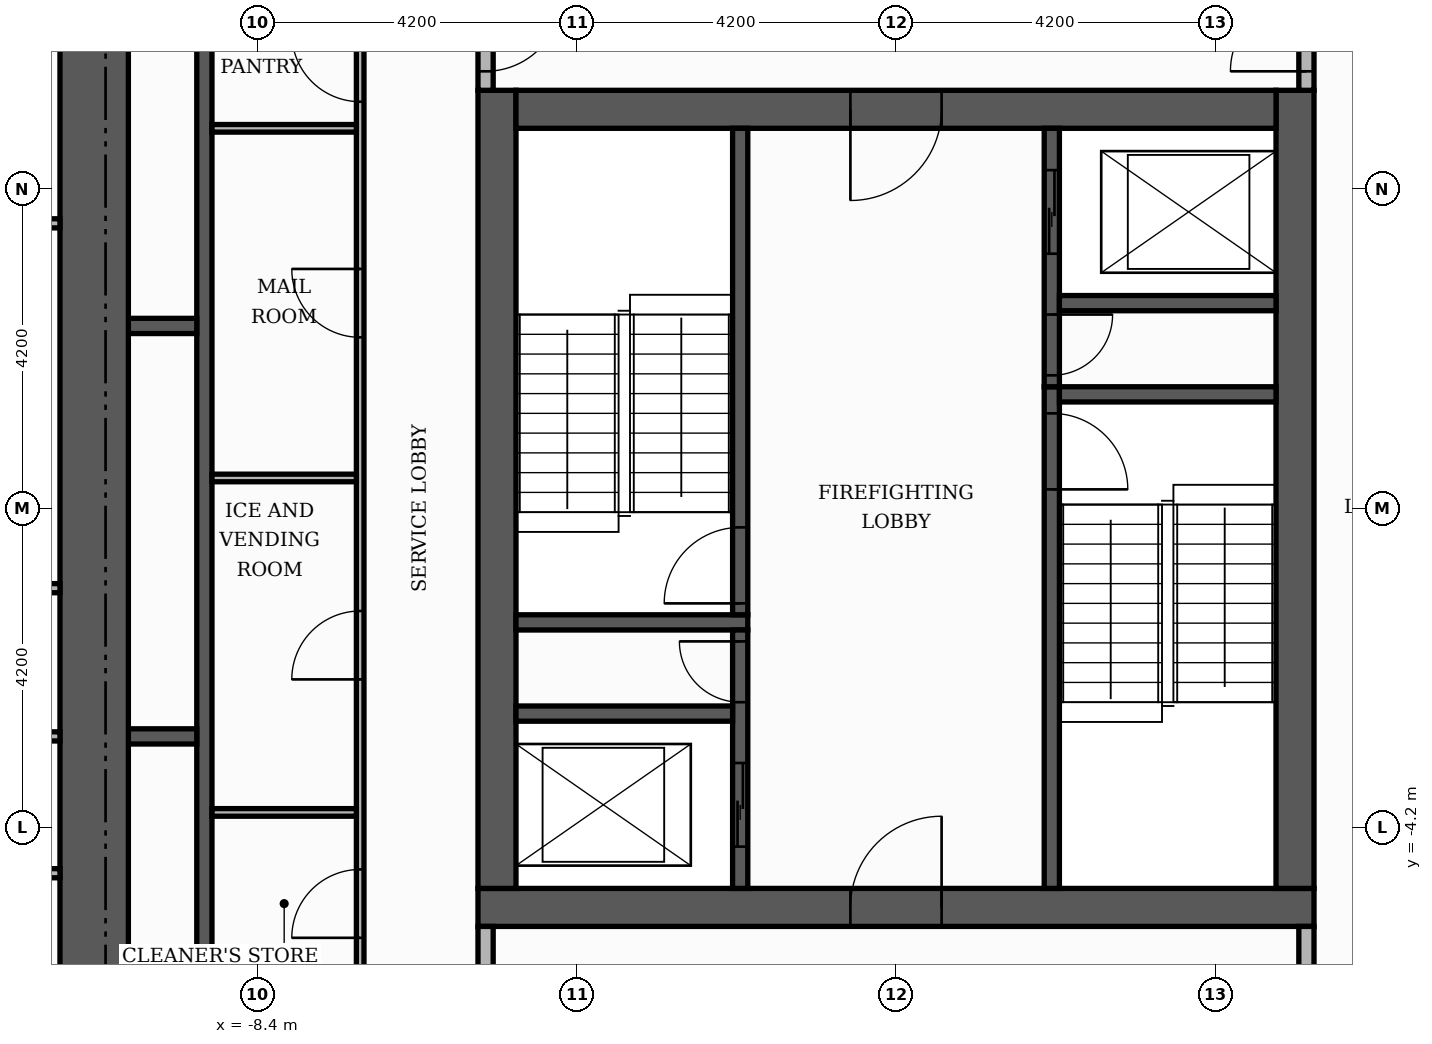
"""IFC4 building model, lengths in metres.
Left out: names, types, materials, properties, quantities, classifications, styles, units other than length and angle.
Written with IfcOpenShell. Run it as: python <this file> out.ifc"""

import sys

from ifc_helpers import new_model, si_unit, direction, frame, frame_2d, origin, place, context, subcontext, project, spatial, rectangle, extrude, element, fill, save


model = new_model("IFC4")
c1 = context("Model", 3, precision=1e-05, world=origin(), true_north=direction((0.0, 1.0)))
c2 = subcontext(c1, "Body", "Model", "MODEL_VIEW")
j1 = project(units=[si_unit("LENGTHUNIT", "METRE"), si_unit("PLANEANGLEUNIT", "RADIAN")], contexts=[c1])
p1 = place(None, origin())
s1 = spatial("IfcSite", under=j1, at=p1, CompositionType="ELEMENT")
p2 = place(p1, origin())
s2 = spatial("IfcBuilding", under=s1, at=p2, CompositionType="ELEMENT")
p3 = place(p2, frame((0.0, 0.0, 279.6)))
s3 = spatial("IfcBuildingStorey", under=s2, at=p3, CompositionType="ELEMENT", Elevation=279.6)
p4 = place(p3, frame((-5.5, -5.25, 0.0), z_axis=(0.0, 0.0, 1.0), x_axis=(1.0, 0.0, 0.0)))
e1 = element("IfcWall", 1, at=p4, inside=s3, PredefinedType="SHEAR", context=c2, shape_type="SweptSolid", body=[
    extrude(rectangle(XDim=11.0, YDim=0.5, at=frame_2d((5.5, 0.0))), origin(), (0.0, 0.0, 1.0), 3.48),
])
p5 = place(p4, frame((4.9, 0.0, 0.0)))
e2 = element("IfcOpeningElement", 2, at=p5, cuts=e1, PredefinedType="OPENING", context=c2, shape_type="SweptSolid", body=[
    extrude(rectangle(XDim=1.2, YDim=2.1, at=frame_2d((0.6, 1.05))), frame((0.0, 0.26, 0.0), z_axis=(0.0, -1.0, 0.0), x_axis=(1.0, 0.0, 0.0)), (0.0, 0.0, 1.0), 0.52),
])
for number, where, z_axis, x_axis in (
    (3, (-5.25, -5.0, 0.0), (0.0, 0.0, 1.0), (0.0, 1.0, 0.0)),
    (4, (5.25, -5.0, 0.0), (0.0, 0.0, 1.0), (0.0, 1.0, 0.0)),
):
    element("IfcWall", number, at=place(p3, frame(where, z_axis=z_axis, x_axis=x_axis)), inside=s3, PredefinedType="SHEAR", context=c2, shape_type="SweptSolid", body=[
        extrude(rectangle(XDim=10.5, YDim=0.5, at=frame_2d((5.25, 0.0))), origin(), (0.0, 0.0, 1.0), 3.48),
    ])
p6 = place(p3, frame((-5.0, 5.25, 0.0), z_axis=(0.0, 0.0, 1.0), x_axis=(1.0, 0.0, 0.0)))
e5 = element("IfcWall", 5, at=p6, inside=s3, PredefinedType="SHEAR", context=c2, shape_type="SweptSolid", body=[
    extrude(rectangle(XDim=10.0, YDim=0.5, at=frame_2d((5.0, 0.0))), origin(), (0.0, 0.0, 1.0), 3.48),
])
p7 = place(p6, frame((4.4, 0.0, 0.0)))
e6 = element("IfcOpeningElement", 6, at=p7, cuts=e5, PredefinedType="OPENING", context=c2, shape_type="SweptSolid", body=[
    extrude(rectangle(XDim=1.2, YDim=2.1, at=frame_2d((0.6, 1.05))), frame((0.0, 0.26, 0.0), z_axis=(0.0, -1.0, 0.0), x_axis=(1.0, 0.0, 0.0)), (0.0, 0.0, 1.0), 0.52),
])
p8 = place(p3, frame((2.05, -5.0, 0.0), z_axis=(0.0, 0.0, 1.0), x_axis=(0.0, 1.0, 0.0)))
e7 = element("IfcWall", 7, at=p8, inside=s3, PredefinedType="SHEAR", context=c2, shape_type="SweptSolid", body=[
    extrude(rectangle(XDim=6.6, YDim=0.2, at=frame_2d((3.3, 0.0))), origin(), (0.0, 0.0, 1.0), 3.48),
])
p9 = place(p8, frame((5.25, 0.0, 0.0)))
e8 = element("IfcOpeningElement", 8, at=p9, cuts=e7, PredefinedType="OPENING", context=c2, shape_type="SweptSolid", body=[
    extrude(rectangle(XDim=1.0, YDim=2.1, at=frame_2d((0.5, 1.05))), frame((0.0, 0.11, 0.0), z_axis=(0.0, -1.0, 0.0), x_axis=(1.0, 0.0, 0.0)), (0.0, 0.0, 1.0), 0.22),
])
p10 = place(p3, frame((-5.0, -1.5, 0.0), z_axis=(0.0, 0.0, 1.0), x_axis=(1.0, 0.0, 0.0)))
e9 = element("IfcWall", 9, at=p10, inside=s3, PredefinedType="SHEAR", context=c2, shape_type="SweptSolid", body=[
    extrude(rectangle(XDim=3.05, YDim=0.2, at=frame_2d((1.525, 0.0))), origin(), (0.0, 0.0, 1.0), 3.48),
])
p11 = place(p3, frame((-2.05, -1.4, 0.0), z_axis=(0.0, 0.0, 1.0), x_axis=(0.0, 1.0, 0.0)))
e10 = element("IfcWall", 10, at=p11, inside=s3, PredefinedType="SHEAR", context=c2, shape_type="SweptSolid", body=[
    extrude(rectangle(XDim=6.4, YDim=0.2, at=frame_2d((3.2, 0.0))), origin(), (0.0, 0.0, 1.0), 3.48),
])
p12 = place(p11, frame((0.15, 0.0, 0.0)))
e11 = element("IfcOpeningElement", 11, at=p12, cuts=e10, PredefinedType="OPENING", context=c2, shape_type="SweptSolid", body=[
    extrude(rectangle(XDim=1.0, YDim=2.1, at=frame_2d((0.5, 1.05))), frame((0.0, 0.11, 0.0), z_axis=(0.0, -1.0, 0.0), x_axis=(1.0, 0.0, 0.0)), (0.0, 0.0, 1.0), 0.22),
])
p13 = place(p3, frame((2.15, 1.5, 0.0), z_axis=(0.0, 0.0, 1.0), x_axis=(1.0, 0.0, 0.0)))
e12 = element("IfcWall", 12, at=p13, inside=s3, PredefinedType="SHEAR", context=c2, shape_type="SweptSolid", body=[
    extrude(rectangle(XDim=2.85, YDim=0.2, at=frame_2d((1.425, 0.0))), origin(), (0.0, 0.0, 1.0), 3.48),
])
p14 = place(p3, frame((-9.1, -8.2, 0.0), z_axis=(0.0, 0.0, 1.0), x_axis=(0.0, 1.0, 0.0)))
e13 = element("IfcWall", 13, at=p14, inside=s3, PredefinedType="SHEAR", context=c2, shape_type="SweptSolid", body=[
    extrude(rectangle(XDim=16.4, YDim=0.2, at=frame_2d((8.2, 0.0))), origin(), (0.0, 0.0, 1.0), 3.48),
])
p15 = place(p3, frame((-2.05, -5.0, 0.0), z_axis=(0.0, 0.0, 1.0), x_axis=(0.0, 1.0, 0.0)))
e14 = element("IfcWall", 14, at=p15, inside=s3, PredefinedType="SHEAR", context=c2, shape_type="SweptSolid", body=[
    extrude(rectangle(XDim=3.4, YDim=0.2, at=frame_2d((1.7, 0.0))), origin(), (0.0, 0.0, 1.0), 3.48),
])
p16 = place(p15, frame((0.55, 0.0, 0.0)))
e15 = element("IfcOpeningElement", 15, at=p16, cuts=e14, PredefinedType="OPENING", context=c2, shape_type="SweptSolid", body=[
    extrude(rectangle(XDim=1.1, YDim=2.1, at=frame_2d((0.55, 1.05))), frame((0.0, 0.11, 0.0), z_axis=(0.0, -1.0, 0.0), x_axis=(1.0, 0.0, 0.0)), (0.0, 0.0, 1.0), 0.22),
])
p17 = place(p15, frame((2.45, 0.0, 0.0)))
e16 = element("IfcOpeningElement", 16, at=p17, cuts=e14, PredefinedType="OPENING", context=c2, shape_type="SweptSolid", body=[
    extrude(rectangle(XDim=0.8, YDim=2.1, at=frame_2d((0.4, 1.05))), frame((0.0, 0.11, 0.0), z_axis=(0.0, -1.0, 0.0), x_axis=(1.0, 0.0, 0.0)), (0.0, 0.0, 1.0), 0.22),
])
p18 = place(p3, frame((-10.1, -3.0, 0.0), z_axis=(0.0, 0.0, 1.0), x_axis=(1.0, 0.0, 0.0)))
e17 = element("IfcWall", 17, at=p18, inside=s3, PredefinedType="SHEAR", context=c2, shape_type="SweptSolid", body=[
    extrude(rectangle(XDim=0.9, YDim=0.2, at=frame_2d((0.45, 0.0))), origin(), (0.0, 0.0, 1.0), 3.48),
])
p19 = place(p3, frame((-5.0, -2.7, 0.0), z_axis=(0.0, 0.0, 1.0), x_axis=(1.0, 0.0, 0.0)))
e18 = element("IfcWall", 18, at=p19, inside=s3, PredefinedType="SHEAR", context=c2, shape_type="SweptSolid", body=[
    extrude(rectangle(XDim=2.85, YDim=0.2, at=frame_2d((1.425, 0.0))), origin(), (0.0, 0.0, 1.0), 3.48),
])
p20 = place(p3, frame((2.05, 1.6, 0.0), z_axis=(0.0, 0.0, 1.0), x_axis=(0.0, 1.0, 0.0)))
e19 = element("IfcWall", 19, at=p20, inside=s3, PredefinedType="SHEAR", context=c2, shape_type="SweptSolid", body=[
    extrude(rectangle(XDim=3.4, YDim=0.2, at=frame_2d((1.7, 0.0))), origin(), (0.0, 0.0, 1.0), 3.48),
])
p21 = place(p20, frame((1.75, 0.0, 0.0)))
e20 = element("IfcOpeningElement", 20, at=p21, cuts=e19, PredefinedType="OPENING", context=c2, shape_type="SweptSolid", body=[
    extrude(rectangle(XDim=1.1, YDim=2.1, at=frame_2d((0.55, 1.05))), frame((0.0, 0.11, 0.0), z_axis=(0.0, -1.0, 0.0), x_axis=(1.0, 0.0, 0.0)), (0.0, 0.0, 1.0), 0.22),
])
p22 = place(p20, frame((0.15, 0.0, 0.0)))
e21 = element("IfcOpeningElement", 21, at=p22, cuts=e19, PredefinedType="OPENING", context=c2, shape_type="SweptSolid", body=[
    extrude(rectangle(XDim=0.8, YDim=2.1, at=frame_2d((0.4, 1.05))), frame((0.0, 0.11, 0.0), z_axis=(0.0, -1.0, 0.0), x_axis=(1.0, 0.0, 0.0)), (0.0, 0.0, 1.0), 0.22),
])
p23 = place(p3, frame((-10.1, 2.4, 0.0), z_axis=(0.0, 0.0, 1.0), x_axis=(1.0, 0.0, 0.0)))
e22 = element("IfcWall", 22, at=p23, inside=s3, PredefinedType="SHEAR", context=c2, shape_type="SweptSolid", body=[
    extrude(rectangle(XDim=0.9, YDim=0.2, at=frame_2d((0.45, 0.0))), origin(), (0.0, 0.0, 1.0), 3.48),
])
p24 = place(p3, frame((2.15, 2.7, 0.0), z_axis=(0.0, 0.0, 1.0), x_axis=(1.0, 0.0, 0.0)))
e23 = element("IfcWall", 23, at=p24, inside=s3, PredefinedType="SHEAR", context=c2, shape_type="SweptSolid", body=[
    extrude(rectangle(XDim=2.85, YDim=0.2, at=frame_2d((1.425, 0.0))), origin(), (0.0, 0.0, 1.0), 3.48),
])
p25 = place(p3, frame((-10.55, -10.1, 0.0), z_axis=(0.0, 0.0, 1.0), x_axis=(0.0, 1.0, 0.0)))
e24 = element("IfcWall", 24, at=p25, inside=s3, PredefinedType="SHEAR", context=c2, shape_type="SweptSolid", body=[
    extrude(rectangle(XDim=20.2, YDim=0.9, at=frame_2d((10.1, 0.0))), origin(), (0.0, 0.0, 1.0), 3.48),
])
p26 = place(p3, frame((-5.4, -10.1, 0.0), z_axis=(0.0, 0.0, 1.0), x_axis=(0.0, 1.0, 0.0)))
e25 = element("IfcWall", 25, at=p26, inside=s3, PredefinedType="PARTITIONING", context=c2, shape_type="SweptSolid", body=[
    extrude(rectangle(XDim=4.6, YDim=0.2, at=frame_2d((2.3, 0.0))), origin(), (0.0, 0.0, 1.0), 3.48),
])
p27 = place(p26, frame((2.9, 0.0, 0.0)))
e26 = element("IfcOpeningElement", 26, at=p27, cuts=e25, PredefinedType="OPENING", context=c2, shape_type="SweptSolid", body=[
    extrude(rectangle(XDim=1.0, YDim=2.1, at=frame_2d((0.5, 1.05))), frame((0.0, 0.11, 0.0), z_axis=(0.0, -1.0, 0.0), x_axis=(1.0, 0.0, 0.0)), (0.0, 0.0, 1.0), 0.22),
])
p28 = place(p3, frame((5.4, -10.1, 0.0), z_axis=(0.0, 0.0, 1.0), x_axis=(0.0, 1.0, 0.0)))
e27 = element("IfcWall", 27, at=p28, inside=s3, PredefinedType="PARTITIONING", context=c2, shape_type="SweptSolid", body=[
    extrude(rectangle(XDim=4.6, YDim=0.2, at=frame_2d((2.3, 0.0))), origin(), (0.0, 0.0, 1.0), 3.48),
])
p29 = place(p28, frame((2.9, 0.0, 0.0)))
e28 = element("IfcOpeningElement", 28, at=p29, cuts=e27, PredefinedType="OPENING", context=c2, shape_type="SweptSolid", body=[
    extrude(rectangle(XDim=1.0, YDim=2.1, at=frame_2d((0.5, 1.05))), frame((0.0, 0.11, 0.0), z_axis=(0.0, -1.0, 0.0), x_axis=(1.0, 0.0, 0.0)), (0.0, 0.0, 1.0), 0.22),
])
p30 = place(p3, frame((-7.05, -8.2, 0.0), z_axis=(0.0, 0.0, 1.0), x_axis=(0.0, 1.0, 0.0)))
e29 = element("IfcWall", 29, at=p30, inside=s3, PredefinedType="PARTITIONING", context=c2, shape_type="SweptSolid", body=[
    extrude(rectangle(XDim=16.4, YDim=0.1, at=frame_2d((8.2, 0.0))), origin(), (0.0, 0.0, 1.0), 3.48),
])
p31 = place(p30, frame((0.45, 0.0, 0.0)))
e30 = element("IfcOpeningElement", 30, at=p31, cuts=e29, PredefinedType="OPENING", context=c2, shape_type="SweptSolid", body=[
    extrude(rectangle(XDim=0.9, YDim=2.1, at=frame_2d((0.45, 1.05))), frame((0.0, 0.06, 0.0), z_axis=(0.0, -1.0, 0.0), x_axis=(1.0, 0.0, 0.0)), (0.0, 0.0, 1.0), 0.12),
])
p32 = place(p30, frame((2.55, 0.0, 0.0)))
e31 = element("IfcOpeningElement", 31, at=p32, cuts=e29, PredefinedType="OPENING", context=c2, shape_type="SweptSolid", body=[
    extrude(rectangle(XDim=0.9, YDim=2.1, at=frame_2d((0.45, 1.05))), frame((0.0, 0.06, 0.0), z_axis=(0.0, -1.0, 0.0), x_axis=(1.0, 0.0, 0.0)), (0.0, 0.0, 1.0), 0.12),
])
p33 = place(p30, frame((5.95, 0.0, 0.0)))
e32 = element("IfcOpeningElement", 32, at=p33, cuts=e29, PredefinedType="OPENING", context=c2, shape_type="SweptSolid", body=[
    extrude(rectangle(XDim=0.9, YDim=2.1, at=frame_2d((0.45, 1.05))), frame((0.0, 0.06, 0.0), z_axis=(0.0, -1.0, 0.0), x_axis=(1.0, 0.0, 0.0)), (0.0, 0.0, 1.0), 0.12),
])
p34 = place(p30, frame((10.45, 0.0, 0.0)))
e33 = element("IfcOpeningElement", 33, at=p34, cuts=e29, PredefinedType="OPENING", context=c2, shape_type="SweptSolid", body=[
    extrude(rectangle(XDim=0.9, YDim=2.1, at=frame_2d((0.45, 1.05))), frame((0.0, 0.06, 0.0), z_axis=(0.0, -1.0, 0.0), x_axis=(1.0, 0.0, 0.0)), (0.0, 0.0, 1.0), 0.12),
])
p35 = place(p30, frame((13.55, 0.0, 0.0)))
e34 = element("IfcOpeningElement", 34, at=p35, cuts=e29, PredefinedType="OPENING", context=c2, shape_type="SweptSolid", body=[
    extrude(rectangle(XDim=0.9, YDim=2.1, at=frame_2d((0.45, 1.05))), frame((0.0, 0.06, 0.0), z_axis=(0.0, -1.0, 0.0), x_axis=(1.0, 0.0, 0.0)), (0.0, 0.0, 1.0), 0.12),
])
p36 = place(p30, frame((15.1, 0.0, 0.0)))
e35 = element("IfcOpeningElement", 35, at=p36, cuts=e29, PredefinedType="OPENING", context=c2, shape_type="SweptSolid", body=[
    extrude(rectangle(XDim=1.0, YDim=2.1, at=frame_2d((0.5, 1.05))), frame((0.0, 0.06, 0.0), z_axis=(0.0, -1.0, 0.0), x_axis=(1.0, 0.0, 0.0)), (0.0, 0.0, 1.0), 0.12),
])
for number, where, z_axis, x_axis in (
    (36, (-9.0, -4.0, 0.0), (0.0, 0.0, 1.0), (1.0, 0.0, 0.0)),
    (37, (-9.0, 0.4, 0.0), (0.0, 0.0, 1.0), (1.0, 0.0, 0.0)),
    (38, (-9.0, 5.0, 0.0), (0.0, 0.0, 1.0), (1.0, 0.0, 0.0)),
):
    element("IfcWall", number, at=place(p3, frame(where, z_axis=z_axis, x_axis=x_axis)), inside=s3, PredefinedType="PARTITIONING", context=c2, shape_type="SweptSolid", body=[
        extrude(rectangle(XDim=1.9, YDim=0.1, at=frame_2d((0.95, 0.0))), origin(), (0.0, 0.0, 1.0), 3.48),
    ])
p37 = place(p3, frame((-5.4, 5.5, 0.0), z_axis=(0.0, 0.0, 1.0), x_axis=(0.0, 1.0, 0.0)))
e39 = element("IfcWall", 39, at=p37, inside=s3, PredefinedType="PARTITIONING", context=c2, shape_type="SweptSolid", body=[
    extrude(rectangle(XDim=1.55, YDim=0.2, at=frame_2d((0.775, 0.0))), origin(), (0.0, 0.0, 1.0), 3.48),
])
p38 = place(p37, frame((0.25, 0.0, 0.0)))
e40 = element("IfcOpeningElement", 40, at=p38, cuts=e39, PredefinedType="OPENING", context=c2, shape_type="SweptSolid", body=[
    extrude(rectangle(XDim=1.0, YDim=2.1, at=frame_2d((0.5, 1.05))), frame((0.0, 0.11, 0.0), z_axis=(0.0, -1.0, 0.0), x_axis=(1.0, 0.0, 0.0)), (0.0, 0.0, 1.0), 0.22),
])
p39 = place(p3, frame((5.4, 5.5, 0.0), z_axis=(0.0, 0.0, 1.0), x_axis=(0.0, 1.0, 0.0)))
e41 = element("IfcWall", 41, at=p39, inside=s3, PredefinedType="PARTITIONING", context=c2, shape_type="SweptSolid", body=[
    extrude(rectangle(XDim=4.6, YDim=0.2, at=frame_2d((2.3, 0.0))), origin(), (0.0, 0.0, 1.0), 3.48),
])
p40 = place(p39, frame((0.25, 0.0, 0.0)))
e42 = element("IfcOpeningElement", 42, at=p40, cuts=e41, PredefinedType="OPENING", context=c2, shape_type="SweptSolid", body=[
    extrude(rectangle(XDim=1.0, YDim=2.1, at=frame_2d((0.5, 1.05))), frame((0.0, 0.11, 0.0), z_axis=(0.0, -1.0, 0.0), x_axis=(1.0, 0.0, 0.0)), (0.0, 0.0, 1.0), 0.22),
])
for number, where, z_axis, x_axis in (
    (43, (-18.32, -4.8, 0.0), (0.0, 0.0, 1.0), (1.0, 0.0, 0.0)),
    (44, (-18.32, -3.0, 0.0), (0.0, 0.0, 1.0), (1.0, 0.0, 0.0)),
    (45, (-18.32, -1.05, 0.0), (0.0, 0.0, 1.0), (1.0, 0.0, 0.0)),
    (46, (-18.32, 3.75, 0.0), (0.0, 0.0, 1.0), (1.0, 0.0, 0.0)),
):
    element("IfcWall", number, at=place(p3, frame(where, z_axis=z_axis, x_axis=x_axis)), inside=s3, PredefinedType="PARTITIONING", context=c2, shape_type="SweptSolid", body=[
        extrude(rectangle(XDim=7.32, YDim=0.12, at=frame_2d((3.66, 0.0))), origin(), (0.0, 0.0, 1.0), 3.48),
    ])
p41 = place(p21, origin())
e47 = element("IfcDoor", 47, at=p41, inside=s3, OperationType="SLIDING_TO_LEFT", PredefinedType="DOOR", context=c2, shape_type="SweptSolid", body=[
    extrude(rectangle(XDim=1.1, YDim=2.1, at=frame_2d((0.55, 1.05))), frame((0.0, 0.025, 0.0), z_axis=(0.0, -1.0, 0.0), x_axis=(1.0, 0.0, 0.0)), (0.0, 0.0, 1.0), 0.05),
])
fill(e20, e47)
p42 = place(p16, origin())
e48 = element("IfcDoor", 48, at=p42, inside=s3, OperationType="SLIDING_TO_LEFT", PredefinedType="DOOR", context=c2, shape_type="SweptSolid", body=[
    extrude(rectangle(XDim=1.1, YDim=2.1, at=frame_2d((0.55, 1.05))), frame((0.0, 0.025, 0.0), z_axis=(0.0, -1.0, 0.0), x_axis=(1.0, 0.0, 0.0)), (0.0, 0.0, 1.0), 0.05),
])
fill(e15, e48)
p43 = place(p12, origin())
e49 = element("IfcDoor", 49, at=p43, inside=s3, OperationType="SINGLE_SWING_LEFT", PredefinedType="DOOR", context=c2, shape_type="SweptSolid", body=[
    extrude(rectangle(XDim=1.0, YDim=2.1, at=frame_2d((0.5, 1.05))), frame((0.0, 0.025, 0.0), z_axis=(0.0, -1.0, 0.0), x_axis=(1.0, 0.0, 0.0)), (0.0, 0.0, 1.0), 0.05),
])
fill(e11, e49)
p44 = place(p9, frame((1.0, 0.0, 0.0), z_axis=(0.0, 0.0, 1.0), x_axis=(-1.0, 0.0, 0.0)))
e50 = element("IfcDoor", 50, at=p44, inside=s3, OperationType="SINGLE_SWING_LEFT", PredefinedType="DOOR", context=c2, shape_type="SweptSolid", body=[
    extrude(rectangle(XDim=1.0, YDim=2.1, at=frame_2d((0.5, 1.05))), frame((0.0, 0.025, 0.0), z_axis=(0.0, -1.0, 0.0), x_axis=(1.0, 0.0, 0.0)), (0.0, 0.0, 1.0), 0.05),
])
fill(e8, e50)
p45 = place(p22, frame((0.8, 0.0, 0.0), z_axis=(0.0, 0.0, 1.0), x_axis=(-1.0, 0.0, 0.0)))
e51 = element("IfcDoor", 51, at=p45, inside=s3, OperationType="SINGLE_SWING_RIGHT", PredefinedType="DOOR", context=c2, shape_type="SweptSolid", body=[
    extrude(rectangle(XDim=0.8, YDim=2.1, at=frame_2d((0.4, 1.05))), frame((0.0, 0.025, 0.0), z_axis=(0.0, -1.0, 0.0), x_axis=(1.0, 0.0, 0.0)), (0.0, 0.0, 1.0), 0.05),
])
fill(e21, e51)
p46 = place(p17, origin())
e52 = element("IfcDoor", 52, at=p46, inside=s3, OperationType="SINGLE_SWING_RIGHT", PredefinedType="DOOR", context=c2, shape_type="SweptSolid", body=[
    extrude(rectangle(XDim=0.8, YDim=2.1, at=frame_2d((0.4, 1.05))), frame((0.0, 0.025, 0.0), z_axis=(0.0, -1.0, 0.0), x_axis=(1.0, 0.0, 0.0)), (0.0, 0.0, 1.0), 0.05),
])
fill(e16, e52)
p47 = place(p7, frame((1.2, 0.0, 0.0), z_axis=(0.0, 0.0, 1.0), x_axis=(-1.0, 0.0, 0.0)))
e53 = element("IfcDoor", 53, at=p47, inside=s3, OperationType="SINGLE_SWING_LEFT", PredefinedType="DOOR", context=c2, shape_type="SweptSolid", body=[
    extrude(rectangle(XDim=1.2, YDim=2.1, at=frame_2d((0.6, 1.05))), frame((0.0, 0.025, 0.0), z_axis=(0.0, -1.0, 0.0), x_axis=(1.0, 0.0, 0.0)), (0.0, 0.0, 1.0), 0.05),
])
fill(e6, e53)
p48 = place(p5, origin())
e54 = element("IfcDoor", 54, at=p48, inside=s3, OperationType="SINGLE_SWING_RIGHT", PredefinedType="DOOR", context=c2, shape_type="SweptSolid", body=[
    extrude(rectangle(XDim=1.2, YDim=2.1, at=frame_2d((0.6, 1.05))), frame((0.0, 0.025, 0.0), z_axis=(0.0, -1.0, 0.0), x_axis=(1.0, 0.0, 0.0)), (0.0, 0.0, 1.0), 0.05),
])
fill(e2, e54)
p49 = place(p38, frame((1.0, 0.0, 0.0), z_axis=(0.0, 0.0, 1.0), x_axis=(-1.0, 0.0, 0.0)))
e55 = element("IfcDoor", 55, at=p49, inside=s3, OperationType="SINGLE_SWING_RIGHT", PredefinedType="DOOR", context=c2, shape_type="SweptSolid", body=[
    extrude(rectangle(XDim=1.0, YDim=2.1, at=frame_2d((0.5, 1.05))), frame((0.0, 0.025, 0.0), z_axis=(0.0, -1.0, 0.0), x_axis=(1.0, 0.0, 0.0)), (0.0, 0.0, 1.0), 0.05),
])
fill(e40, e55)
p50 = place(p40, origin())
e56 = element("IfcDoor", 56, at=p50, inside=s3, OperationType="SINGLE_SWING_LEFT", PredefinedType="DOOR", context=c2, shape_type="SweptSolid", body=[
    extrude(rectangle(XDim=1.0, YDim=2.1, at=frame_2d((0.5, 1.05))), frame((0.0, 0.025, 0.0), z_axis=(0.0, -1.0, 0.0), x_axis=(1.0, 0.0, 0.0)), (0.0, 0.0, 1.0), 0.05),
])
fill(e42, e56)
p51 = place(p32, origin())
e57 = element("IfcDoor", 57, at=p51, inside=s3, OperationType="SINGLE_SWING_LEFT", PredefinedType="DOOR", context=c2, shape_type="SweptSolid", body=[
    extrude(rectangle(XDim=0.9, YDim=2.1, at=frame_2d((0.45, 1.05))), frame((0.0, 0.025, 0.0), z_axis=(0.0, -1.0, 0.0), x_axis=(1.0, 0.0, 0.0)), (0.0, 0.0, 1.0), 0.05),
])
fill(e31, e57)
p52 = place(p33, origin())
e58 = element("IfcDoor", 58, at=p52, inside=s3, OperationType="SINGLE_SWING_LEFT", PredefinedType="DOOR", context=c2, shape_type="SweptSolid", body=[
    extrude(rectangle(XDim=0.9, YDim=2.1, at=frame_2d((0.45, 1.05))), frame((0.0, 0.025, 0.0), z_axis=(0.0, -1.0, 0.0), x_axis=(1.0, 0.0, 0.0)), (0.0, 0.0, 1.0), 0.05),
])
fill(e32, e58)
p53 = place(p34, origin())
e59 = element("IfcDoor", 59, at=p53, inside=s3, OperationType="SINGLE_SWING_RIGHT", PredefinedType="DOOR", context=c2, shape_type="SweptSolid", body=[
    extrude(rectangle(XDim=0.9, YDim=2.1, at=frame_2d((0.45, 1.05))), frame((0.0, 0.025, 0.0), z_axis=(0.0, -1.0, 0.0), x_axis=(1.0, 0.0, 0.0)), (0.0, 0.0, 1.0), 0.05),
])
fill(e33, e59)
p54 = place(p35, origin())
e60 = element("IfcDoor", 60, at=p54, inside=s3, OperationType="SINGLE_SWING_RIGHT", PredefinedType="DOOR", context=c2, shape_type="SweptSolid", body=[
    extrude(rectangle(XDim=0.9, YDim=2.1, at=frame_2d((0.45, 1.05))), frame((0.0, 0.025, 0.0), z_axis=(0.0, -1.0, 0.0), x_axis=(1.0, 0.0, 0.0)), (0.0, 0.0, 1.0), 0.05),
])
fill(e34, e60)
save(model, sys.argv[1])
